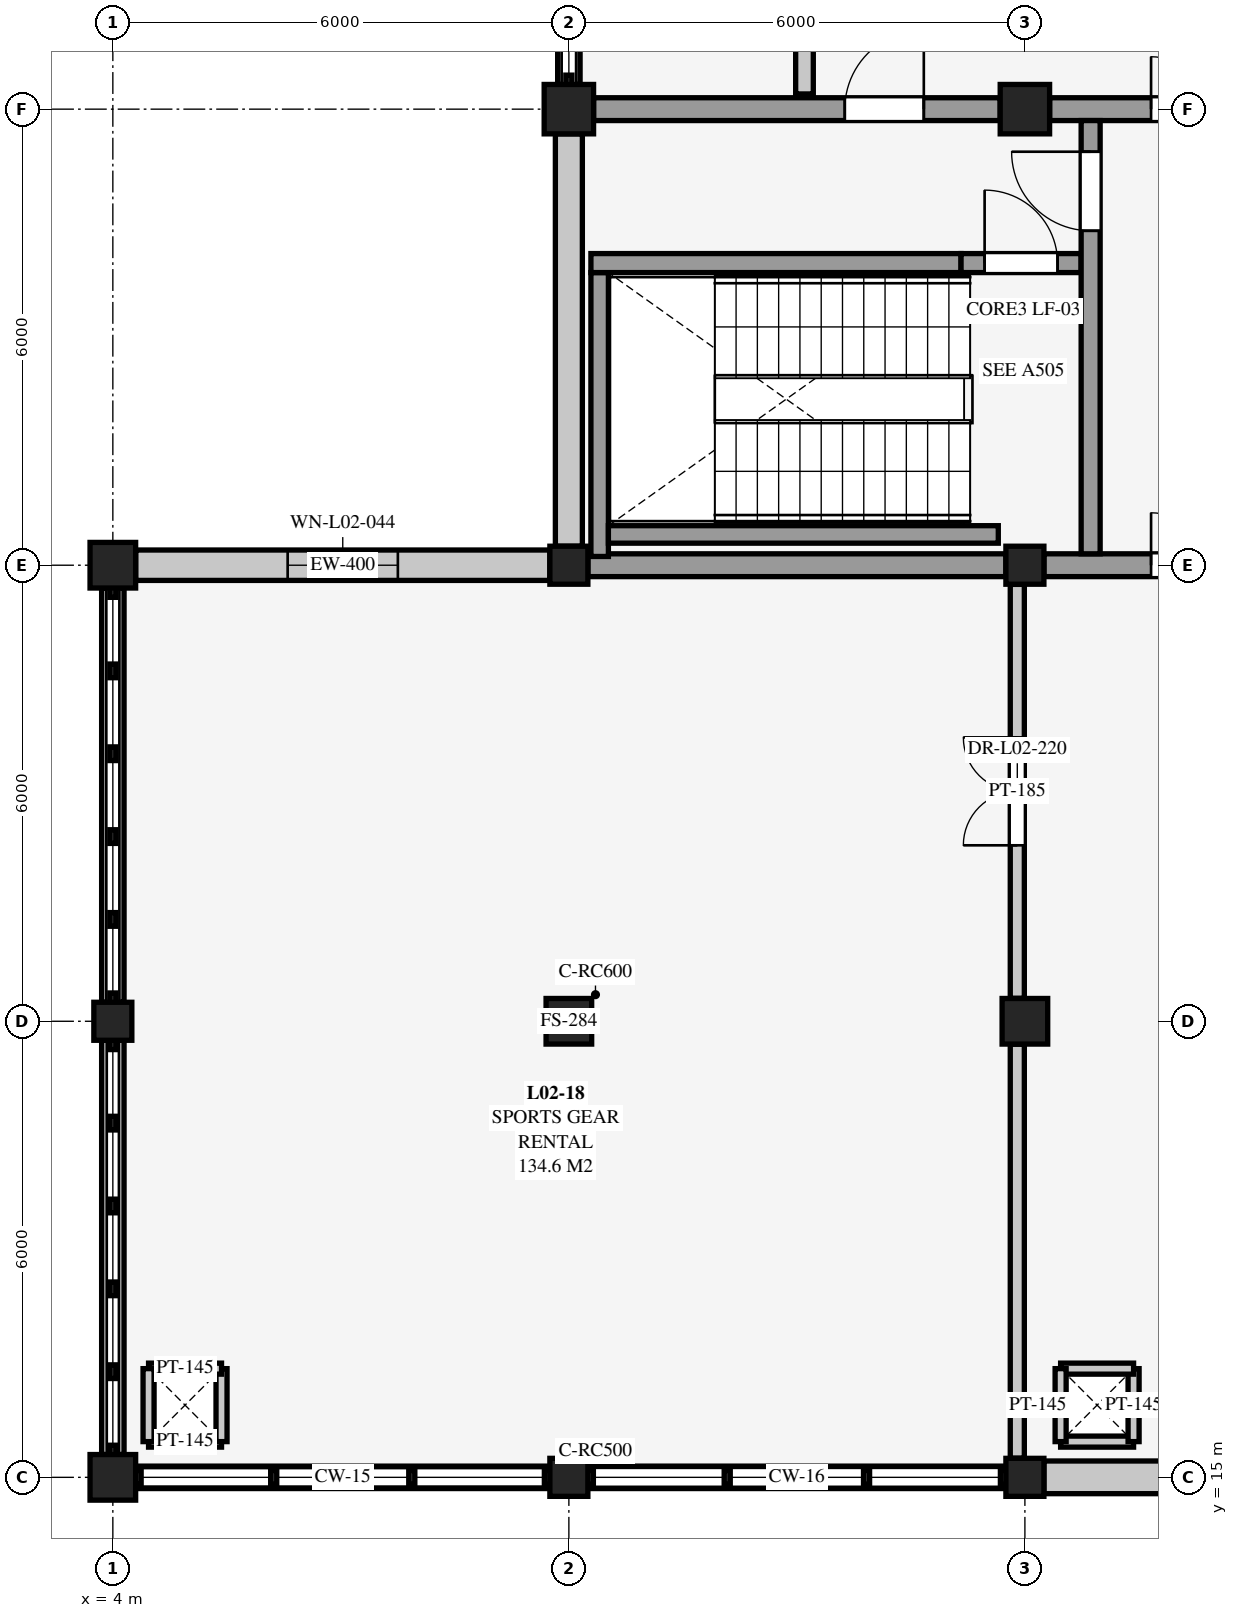
"""IFC4 building model, lengths in metres.
Left out: names, types, materials, properties, quantities, classifications, styles, units other than length and angle.
Written with IfcOpenShell. Run it as: python <this file> out.ifc"""

import sys

from ifc_helpers import new_model, si_unit, direction, frame, frame_2d, origin, origin_2d, place, context, subcontext, project, spatial, rectangle, extrude, element, fill, save


model = new_model("IFC4")
c1 = context("Model", 3, precision=1e-05, world=origin(), true_north=direction((0.0, 1.0)))
c2 = subcontext(c1, "Body", "Model", "MODEL_VIEW")
j1 = project(units=[si_unit("LENGTHUNIT", "METRE"), si_unit("PLANEANGLEUNIT", "RADIAN")], contexts=[c1])
p1 = place(None, origin())
s1 = spatial("IfcSite", under=j1, at=p1, CompositionType="ELEMENT")
p2 = place(p1, origin())
s2 = spatial("IfcBuilding", under=s1, at=p2, CompositionType="ELEMENT")
p3 = place(p2, frame((0.0, 0.0, 4.5)))
s3 = spatial("IfcBuildingStorey", under=s2, at=p3, CompositionType="ELEMENT", Elevation=4.5)
p4 = place(p3, frame((4.0, 15.0, 0.0), z_axis=(0.0, 0.0, 1.0), x_axis=(1.0, 0.0, 0.0)))
e1 = element("IfcColumn", 1, at=p4, inside=s3, PredefinedType="COLUMN", context=c2, shape_type="SweptSolid", body=[
    extrude(rectangle(XDim=0.6, YDim=0.6, at=origin_2d()), origin(), (0.0, 0.0, 1.0), 4.5),
])
p5 = place(p3, frame((4.0, 21.0, 0.0), z_axis=(0.0, 0.0, 1.0), x_axis=(1.0, 0.0, 0.0)))
e2 = element("IfcColumn", 2, at=p5, inside=s3, PredefinedType="COLUMN", context=c2, shape_type="SweptSolid", body=[
    extrude(rectangle(XDim=0.5, YDim=0.5, at=origin_2d()), origin(), (0.0, 0.0, 1.0), 4.5),
])
p6 = place(p3, frame((4.0, 27.0, 0.0), z_axis=(0.0, 0.0, 1.0), x_axis=(1.0, 0.0, 0.0)))
e3 = element("IfcColumn", 3, at=p6, inside=s3, PredefinedType="COLUMN", context=c2, shape_type="SweptSolid", body=[
    extrude(rectangle(XDim=0.6, YDim=0.6, at=origin_2d()), origin(), (0.0, 0.0, 1.0), 4.5),
])
p7 = place(p3, frame((10.0, 15.0, 0.0), z_axis=(0.0, 0.0, 1.0), x_axis=(1.0, 0.0, 0.0)))
e4 = element("IfcColumn", 4, at=p7, inside=s3, PredefinedType="COLUMN", context=c2, shape_type="SweptSolid", body=[
    extrude(rectangle(XDim=0.5, YDim=0.5, at=origin_2d()), origin(), (0.0, 0.0, 1.0), 4.5),
])
p8 = place(p3, frame((10.0, 21.0, 0.0), z_axis=(0.0, 0.0, 1.0), x_axis=(1.0, 0.0, 0.0)))
e5 = element("IfcColumn", 5, at=p8, inside=s3, PredefinedType="COLUMN", context=c2, shape_type="SweptSolid", body=[
    extrude(rectangle(XDim=0.6, YDim=0.6, at=origin_2d()), origin(), (0.0, 0.0, 1.0), 4.5),
])
p9 = place(p3, frame((10.0, 27.0, 0.0), z_axis=(0.0, 0.0, 1.0), x_axis=(1.0, 0.0, 0.0)))
e6 = element("IfcColumn", 6, at=p9, inside=s3, PredefinedType="COLUMN", context=c2, shape_type="SweptSolid", body=[
    extrude(rectangle(XDim=0.5, YDim=0.5, at=origin_2d()), origin(), (0.0, 0.0, 1.0), 4.5),
])
p10 = place(p3, frame((10.0, 33.0, 0.0), z_axis=(0.0, 0.0, 1.0), x_axis=(1.0, 0.0, 0.0)))
e7 = element("IfcColumn", 7, at=p10, inside=s3, PredefinedType="COLUMN", context=c2, shape_type="SweptSolid", body=[
    extrude(rectangle(XDim=0.65, YDim=0.65, at=origin_2d()), origin(), (0.0, 0.0, 1.0), 4.5),
])
p11 = place(p3, frame((16.0, 15.0, 0.0), z_axis=(0.0, 0.0, 1.0), x_axis=(1.0, 0.0, 0.0)))
e8 = element("IfcColumn", 8, at=p11, inside=s3, PredefinedType="COLUMN", context=c2, shape_type="SweptSolid", body=[
    extrude(rectangle(XDim=0.5, YDim=0.5, at=origin_2d()), origin(), (0.0, 0.0, 1.0), 4.5),
])
p12 = place(p3, frame((16.0, 21.0, 0.0), z_axis=(0.0, 0.0, 1.0), x_axis=(1.0, 0.0, 0.0)))
e9 = element("IfcColumn", 9, at=p12, inside=s3, PredefinedType="COLUMN", context=c2, shape_type="SweptSolid", body=[
    extrude(rectangle(XDim=0.6, YDim=0.6, at=origin_2d()), origin(), (0.0, 0.0, 1.0), 4.5),
])
p13 = place(p3, frame((16.0, 27.0, 0.0), z_axis=(0.0, 0.0, 1.0), x_axis=(1.0, 0.0, 0.0)))
e10 = element("IfcColumn", 10, at=p13, inside=s3, PredefinedType="COLUMN", context=c2, shape_type="SweptSolid", body=[
    extrude(rectangle(XDim=0.5, YDim=0.5, at=origin_2d()), origin(), (0.0, 0.0, 1.0), 4.5),
])
p14 = place(p3, frame((16.0, 33.0, 0.0), z_axis=(0.0, 0.0, 1.0), x_axis=(1.0, 0.0, 0.0)))
e11 = element("IfcColumn", 11, at=p14, inside=s3, PredefinedType="COLUMN", context=c2, shape_type="SweptSolid", body=[
    extrude(rectangle(XDim=0.65, YDim=0.65, at=origin_2d()), origin(), (0.0, 0.0, 1.0), 4.5),
])
p15 = place(p3, frame((9.75, 15.0, 0.0), z_axis=(0.0, 0.0, 1.0), x_axis=(-1.0, 0.0, 0.0)))
e12 = element("IfcWall", 12, at=p15, inside=s3, PredefinedType="SOLIDWALL", context=c2, shape_type="SweptSolid", body=[
    extrude(rectangle(XDim=5.45, YDim=0.295, at=frame_2d((2.725, 0.0))), origin(), (0.0, 0.0, 1.0), 0.46),
])
p16 = place(p3, frame((4.3, 27.0, 0.0), z_axis=(0.0, 0.0, 1.0), x_axis=(1.0, 0.0, 0.0)))
e13 = element("IfcWall", 13, at=p16, inside=s3, PredefinedType="SOLIDWALL", context=c2, shape_type="SweptSolid", body=[
    extrude(rectangle(XDim=5.45, YDim=0.4, at=frame_2d((2.725, 0.0))), origin(), (0.0, 0.0, 1.0), 3.778),
])
p17 = place(p16, frame((2.0, 0.0, 1.3)))
e14 = element("IfcOpeningElement", 14, at=p17, cuts=e13, PredefinedType="OPENING", context=c2, shape_type="SweptSolid", body=[
    extrude(rectangle(XDim=1.45, YDim=1.45, at=frame_2d((0.725, 0.725))), frame((0.0, 0.21, 0.0), z_axis=(0.0, -1.0, 0.0), x_axis=(1.0, 0.0, 0.0)), (0.0, 0.0, 1.0), 0.42),
])
p18 = place(p3, frame((15.75, 15.0, 0.0), z_axis=(0.0, 0.0, 1.0), x_axis=(-1.0, 0.0, 0.0)))
e15 = element("IfcWall", 15, at=p18, inside=s3, PredefinedType="SOLIDWALL", context=c2, shape_type="SweptSolid", body=[
    extrude(rectangle(XDim=5.5, YDim=0.295, at=frame_2d((2.75, 0.0))), origin(), (0.0, 0.0, 1.0), 0.52),
])
p19 = place(p3, frame((21.7, 15.0, 0.0), z_axis=(0.0, 0.0, 1.0), x_axis=(-1.0, 0.0, 0.0)))
e16 = element("IfcWall", 16, at=p19, inside=s3, PredefinedType="SOLIDWALL", context=c2, shape_type="SweptSolid", body=[
    extrude(rectangle(XDim=5.45, YDim=0.43, at=frame_2d((2.725, 0.0))), origin(), (0.0, 0.0, 1.0), 3.809),
])
p20 = place(p19, frame((1.925, 0.0, 1.25)))
e17 = element("IfcOpeningElement", 17, at=p20, cuts=e16, PredefinedType="OPENING", context=c2, shape_type="SweptSolid", body=[
    extrude(rectangle(XDim=1.6, YDim=1.5, at=frame_2d((0.8, 0.75))), frame((0.0, 0.225, 0.0), z_axis=(0.0, -1.0, 0.0), x_axis=(1.0, 0.0, 0.0)), (0.0, 0.0, 1.0), 0.45),
])
p21 = place(p3, frame((4.0, 15.3, 0.0), z_axis=(0.0, 0.0, 1.0), x_axis=(0.0, 1.0, 0.0)))
e18 = element("IfcWall", 18, at=p21, inside=s3, PredefinedType="SOLIDWALL", context=c2, shape_type="SweptSolid", body=[
    extrude(rectangle(XDim=5.45, YDim=0.295, at=frame_2d((2.725, 0.0))), origin(), (0.0, 0.0, 1.0), 0.16),
])
p22 = place(p3, frame((4.0, 21.25, 0.0), z_axis=(0.0, 0.0, 1.0), x_axis=(0.0, 1.0, 0.0)))
e19 = element("IfcWall", 19, at=p22, inside=s3, PredefinedType="SOLIDWALL", context=c2, shape_type="SweptSolid", body=[
    extrude(rectangle(XDim=5.45, YDim=0.295, at=frame_2d((2.725, 0.0))), origin(), (0.0, 0.0, 1.0), 0.26),
])
p23 = place(p3, frame((10.0, 27.25, 0.0), z_axis=(0.0, 0.0, 1.0), x_axis=(0.0, 1.0, 0.0)))
e20 = element("IfcWall", 20, at=p23, inside=s3, PredefinedType="SOLIDWALL", context=c2, shape_type="SweptSolid", body=[
    extrude(rectangle(XDim=5.425, YDim=0.355, at=frame_2d((2.712, 0.0))), origin(), (0.0, 0.0, 1.0), 3.778),
])
p24 = place(p3, frame((10.0, 33.325, 0.0), z_axis=(0.0, 0.0, 1.0), x_axis=(0.0, 1.0, 0.0)))
e21 = element("IfcWall", 21, at=p24, inside=s3, PredefinedType="SOLIDWALL", context=c2, shape_type="SweptSolid", body=[
    extrude(rectangle(XDim=5.375, YDim=0.295, at=frame_2d((2.688, 0.0))), origin(), (0.0, 0.0, 1.0), 0.41),
])
for number, where, z_axis, x_axis in (
    (22, (4.47, 15.47, 0.0), (0.0, 0.0, 1.0), (1.0, 0.0, 0.0)),
    (23, (5.43, 15.47, 0.0), (0.0, 0.0, 1.0), (0.0, 1.0, 0.0)),
    (24, (5.43, 16.43, 0.0), (0.0, 0.0, 1.0), (-1.0, 0.0, 0.0)),
    (25, (4.47, 16.43, 0.0), (0.0, 0.0, 1.0), (0.0, -1.0, 0.0)),
    (26, (16.47, 15.47, 0.0), (0.0, 0.0, 1.0), (1.0, 0.0, 0.0)),
    (27, (17.43, 15.47, 0.0), (0.0, 0.0, 1.0), (0.0, 1.0, 0.0)),
    (28, (17.43, 16.43, 0.0), (0.0, 0.0, 1.0), (-1.0, 0.0, 0.0)),
    (29, (16.47, 16.43, 0.0), (0.0, 0.0, 1.0), (0.0, -1.0, 0.0)),
):
    element("IfcWall", number, at=place(p3, frame(where, z_axis=z_axis, x_axis=x_axis)), inside=s3, PredefinedType="PARTITIONING", context=c2, shape_type="SweptSolid", body=[
        extrude(rectangle(XDim=0.96, YDim=0.145, at=frame_2d((0.48, 0.0))), origin(), (0.0, 0.0, 1.0), 4.24),
    ])
p25 = place(p3, frame((10.25, 27.0, 0.0), z_axis=(0.0, 0.0, 1.0), x_axis=(1.0, 0.0, 0.0)))
e30 = element("IfcWall", 30, at=p25, inside=s3, PredefinedType="SHEAR", context=c2, shape_type="SweptSolid", body=[
    extrude(rectangle(XDim=5.5, YDim=0.3, at=frame_2d((2.75, 0.0))), origin(), (0.0, 0.0, 1.0), 4.185),
])
p26 = place(p3, frame((16.25, 27.0, 0.0), z_axis=(0.0, 0.0, 1.0), x_axis=(1.0, 0.0, 0.0)))
e31 = element("IfcWall", 31, at=p26, inside=s3, PredefinedType="SHEAR", context=c2, shape_type="SweptSolid", body=[
    extrude(rectangle(XDim=5.475, YDim=0.3, at=frame_2d((2.738, 0.0))), origin(), (0.0, 0.0, 1.0), 4.185),
])
p27 = place(p26, frame((1.41, 0.0, 0.0)))
e32 = element("IfcOpeningElement", 32, at=p27, cuts=e31, PredefinedType="OPENING", context=c2, shape_type="SweptSolid", body=[
    extrude(rectangle(XDim=1.38, YDim=2.16, at=frame_2d((0.69, 1.08))), frame((0.0, 0.16, 0.0), z_axis=(0.0, -1.0, 0.0), x_axis=(1.0, 0.0, 0.0)), (0.0, 0.0, 1.0), 0.32),
])
p28 = place(p3, frame((10.325, 33.0, 0.0), z_axis=(0.0, 0.0, 1.0), x_axis=(1.0, 0.0, 0.0)))
e33 = element("IfcWall", 33, at=p28, inside=s3, PredefinedType="SHEAR", context=c2, shape_type="SweptSolid", body=[
    extrude(rectangle(XDim=5.35, YDim=0.3, at=frame_2d((2.675, 0.0))), origin(), (0.0, 0.0, 1.0), 4.185),
])
p29 = place(p28, frame((3.305, 0.0, 0.0)))
e34 = element("IfcOpeningElement", 34, at=p29, cuts=e33, PredefinedType="OPENING", context=c2, shape_type="SweptSolid", body=[
    extrude(rectangle(XDim=1.04, YDim=2.14, at=frame_2d((0.52, 1.07))), frame((0.0, 0.16, 0.0), z_axis=(0.0, -1.0, 0.0), x_axis=(1.0, 0.0, 0.0)), (0.0, 0.0, 1.0), 0.32),
])
p30 = place(p3, frame((16.325, 33.0, 0.0), z_axis=(0.0, 0.0, 1.0), x_axis=(1.0, 0.0, 0.0)))
e35 = element("IfcWall", 35, at=p30, inside=s3, PredefinedType="SHEAR", context=c2, shape_type="SweptSolid", body=[
    extrude(rectangle(XDim=5.425, YDim=0.3, at=frame_2d((2.712, 0.0))), origin(), (0.0, 0.0, 1.0), 4.185),
])
p31 = place(p30, frame((1.335, 0.0, 0.0)))
e36 = element("IfcOpeningElement", 36, at=p31, cuts=e35, PredefinedType="OPENING", context=c2, shape_type="SweptSolid", body=[
    extrude(rectangle(XDim=1.38, YDim=2.16, at=frame_2d((0.69, 1.08))), frame((0.0, 0.16, 0.0), z_axis=(0.0, -1.0, 0.0), x_axis=(1.0, 0.0, 0.0)), (0.0, 0.0, 1.0), 0.32),
])
p32 = place(p3, frame((10.405, 27.115, 0.0), z_axis=(0.0, 0.0, 1.0), x_axis=(0.0, 1.0, 0.0)))
e37 = element("IfcWall", 37, at=p32, inside=s3, PredefinedType="SHEAR", context=c2, shape_type="SweptSolid", body=[
    extrude(rectangle(XDim=3.735, YDim=0.23, at=frame_2d((1.868, 0.0))), origin(), (0.0, 0.0, 1.0), 4.5),
])
p33 = place(p3, frame((10.52, 27.405, 0.0), z_axis=(0.0, 0.0, 1.0), x_axis=(1.0, 0.0, 0.0)))
e38 = element("IfcWall", 38, at=p33, inside=s3, PredefinedType="SHEAR", context=c2, shape_type="SweptSolid", body=[
    extrude(rectangle(XDim=5.13, YDim=0.23, at=frame_2d((2.565, 0.0))), origin(), (0.0, 0.0, 1.0), 4.5),
])
p34 = place(p3, frame((10.29, 30.975, 0.0), z_axis=(0.0, 0.0, 1.0), x_axis=(1.0, 0.0, 0.0)))
e39 = element("IfcWall", 39, at=p34, inside=s3, PredefinedType="SHEAR", context=c2, shape_type="SweptSolid", body=[
    extrude(rectangle(XDim=4.87, YDim=0.25, at=frame_2d((2.435, 0.0))), origin(), (0.0, 0.0, 1.0), 4.5),
])
p35 = place(p3, frame((15.16, 30.975, 0.0), z_axis=(0.0, 0.0, 1.0), x_axis=(1.0, 0.0, 0.0)))
e40 = element("IfcWall", 40, at=p35, inside=s3, PredefinedType="SHEAR", context=c2, shape_type="SweptSolid", body=[
    extrude(rectangle(XDim=1.58, YDim=0.25, at=frame_2d((0.79, 0.0))), origin(), (0.0, 0.0, 1.0), 4.185),
])
p36 = place(p35, frame((0.31, 0.0, 0.0)))
e41 = element("IfcOpeningElement", 41, at=p36, cuts=e40, PredefinedType="OPENING", context=c2, shape_type="SweptSolid", body=[
    extrude(rectangle(XDim=0.96, YDim=2.12, at=frame_2d((0.48, 1.06))), frame((0.0, 0.135, 0.0), z_axis=(0.0, -1.0, 0.0), x_axis=(1.0, 0.0, 0.0)), (0.0, 0.0, 1.0), 0.27),
])
p37 = place(p3, frame((16.865, 27.15, 0.0), z_axis=(0.0, 0.0, 1.0), x_axis=(0.0, 1.0, 0.0)))
e42 = element("IfcWall", 42, at=p37, inside=s3, PredefinedType="SHEAR", context=c2, shape_type="SweptSolid", body=[
    extrude(rectangle(XDim=5.7, YDim=0.25, at=frame_2d((2.85, 0.0))), origin(), (0.0, 0.0, 1.0), 4.185),
])
p38 = place(p37, frame((4.25, 0.0, 0.0)))
e43 = element("IfcOpeningElement", 43, at=p38, cuts=e42, PredefinedType="OPENING", context=c2, shape_type="SweptSolid", body=[
    extrude(rectangle(XDim=1.04, YDim=2.14, at=frame_2d((0.52, 1.07))), frame((0.0, 0.135, 0.0), z_axis=(0.0, -1.0, 0.0), x_axis=(1.0, 0.0, 0.0)), (0.0, 0.0, 1.0), 0.27),
])
p39 = place(p3, frame((15.9, 21.302, 0.0), z_axis=(0.0, 0.0, 1.0), x_axis=(0.0, 1.0, 0.0)))
e44 = element("IfcWall", 44, at=p39, inside=s3, PredefinedType="PARTITIONING", context=c2, shape_type="SweptSolid", body=[
    extrude(rectangle(XDim=5.446, YDim=0.185, at=frame_2d((2.723, 0.0))), origin(), (0.0, 0.0, 1.0), 3.831),
])
p40 = place(p39, frame((2.013, 0.0, 0.0)))
e45 = element("IfcOpeningElement", 45, at=p40, cuts=e44, PredefinedType="OPENING", context=c2, shape_type="SweptSolid", body=[
    extrude(rectangle(XDim=1.42, YDim=2.24, at=frame_2d((0.71, 1.12))), frame((0.0, 0.103, 0.0), z_axis=(0.0, -1.0, 0.0), x_axis=(1.0, 0.0, 0.0)), (0.0, 0.0, 1.0), 0.205),
])
p41 = place(p3, frame((15.9, 15.252, 0.0), z_axis=(0.0, 0.0, 1.0), x_axis=(0.0, 1.0, 0.0)))
e46 = element("IfcWall", 46, at=p41, inside=s3, PredefinedType="PARTITIONING", context=c2, shape_type="SweptSolid", body=[
    extrude(rectangle(XDim=5.446, YDim=0.185, at=frame_2d((2.723, 0.0))), origin(), (0.0, 0.0, 1.0), 4.24),
])
p42 = place(p3, frame((13.1, 33.2, 0.0), z_axis=(0.0, 0.0, 1.0), x_axis=(0.0, 1.0, 0.0)))
e47 = element("IfcWall", 47, at=p42, inside=s3, PredefinedType="PARTITIONING", context=c2, shape_type="SweptSolid", body=[
    extrude(rectangle(XDim=11.706, YDim=0.232, at=frame_2d((5.853, 0.0))), origin(), (0.0, 0.0, 1.0), 4.185),
])
p43 = place(p42, frame((5.063, 0.0, 0.0)))
e48 = element("IfcOpeningElement", 48, at=p43, cuts=e47, PredefinedType="OPENING", context=c2, shape_type="SweptSolid", body=[
    extrude(rectangle(XDim=1.58, YDim=2.2, at=frame_2d((0.79, 1.1))), frame((0.0, 0.126, 0.0), z_axis=(0.0, -1.0, 0.0), x_axis=(1.0, 0.0, 0.0)), (0.0, 0.0, 1.0), 0.252),
])
p44 = place(p17, origin())
e49 = element("IfcWindow", 49, at=p44, inside=s3, PartitioningType="SINGLE_PANEL", PredefinedType="WINDOW", context=c2, shape_type="SweptSolid", body=[
    extrude(rectangle(XDim=1.45, YDim=1.45, at=frame_2d((0.725, 0.725))), frame((0.0, 0.03, 0.0), z_axis=(0.0, -1.0, 0.0), x_axis=(1.0, 0.0, 0.0)), (0.0, 0.0, 1.0), 0.06),
])
fill(e14, e49)
p45 = place(p27, origin())
e50 = element("IfcDoor", 50, at=p45, inside=s3, OperationType="DOUBLE_DOOR_SINGLE_SWING", PredefinedType="DOOR", context=c2, shape_type="SweptSolid", body=[
    extrude(rectangle(XDim=1.38, YDim=2.16, at=frame_2d((0.69, 1.08))), frame((0.0, 0.025, 0.0), z_axis=(0.0, -1.0, 0.0), x_axis=(1.0, 0.0, 0.0)), (0.0, 0.0, 1.0), 0.05),
])
fill(e32, e50)
p46 = place(p29, origin())
e51 = element("IfcDoor", 51, at=p46, inside=s3, OperationType="SINGLE_SWING_RIGHT", PredefinedType="DOOR", context=c2, shape_type="SweptSolid", body=[
    extrude(rectangle(XDim=1.04, YDim=2.14, at=frame_2d((0.52, 1.07))), frame((0.0, 0.025, 0.0), z_axis=(0.0, -1.0, 0.0), x_axis=(1.0, 0.0, 0.0)), (0.0, 0.0, 1.0), 0.05),
])
fill(e34, e51)
p47 = place(p31, origin())
e52 = element("IfcDoor", 52, at=p47, inside=s3, OperationType="DOUBLE_DOOR_SINGLE_SWING", PredefinedType="DOOR", context=c2, shape_type="SweptSolid", body=[
    extrude(rectangle(XDim=1.38, YDim=2.16, at=frame_2d((0.69, 1.08))), frame((0.0, 0.025, 0.0), z_axis=(0.0, -1.0, 0.0), x_axis=(1.0, 0.0, 0.0)), (0.0, 0.0, 1.0), 0.05),
])
fill(e36, e52)
p48 = place(p36, origin())
e53 = element("IfcDoor", 53, at=p48, inside=s3, OperationType="SINGLE_SWING_LEFT", PredefinedType="DOOR", context=c2, shape_type="SweptSolid", body=[
    extrude(rectangle(XDim=0.96, YDim=2.12, at=frame_2d((0.48, 1.06))), frame((0.0, 0.025, 0.0), z_axis=(0.0, -1.0, 0.0), x_axis=(1.0, 0.0, 0.0)), (0.0, 0.0, 1.0), 0.05),
])
fill(e41, e53)
p49 = place(p38, origin())
e54 = element("IfcDoor", 54, at=p49, inside=s3, OperationType="SINGLE_SWING_RIGHT", PredefinedType="DOOR", context=c2, shape_type="SweptSolid", body=[
    extrude(rectangle(XDim=1.04, YDim=2.14, at=frame_2d((0.52, 1.07))), frame((0.0, 0.025, 0.0), z_axis=(0.0, -1.0, 0.0), x_axis=(1.0, 0.0, 0.0)), (0.0, 0.0, 1.0), 0.05),
])
fill(e43, e54)
p50 = place(p40, origin())
e55 = element("IfcDoor", 55, at=p50, inside=s3, OperationType="DOUBLE_DOOR_SINGLE_SWING", PredefinedType="DOOR", context=c2, shape_type="SweptSolid", body=[
    extrude(rectangle(XDim=1.42, YDim=2.24, at=frame_2d((0.71, 1.12))), frame((0.0, 0.025, 0.0), z_axis=(0.0, -1.0, 0.0), x_axis=(1.0, 0.0, 0.0)), (0.0, 0.0, 1.0), 0.05),
])
fill(e45, e55)
save(model, sys.argv[1])
